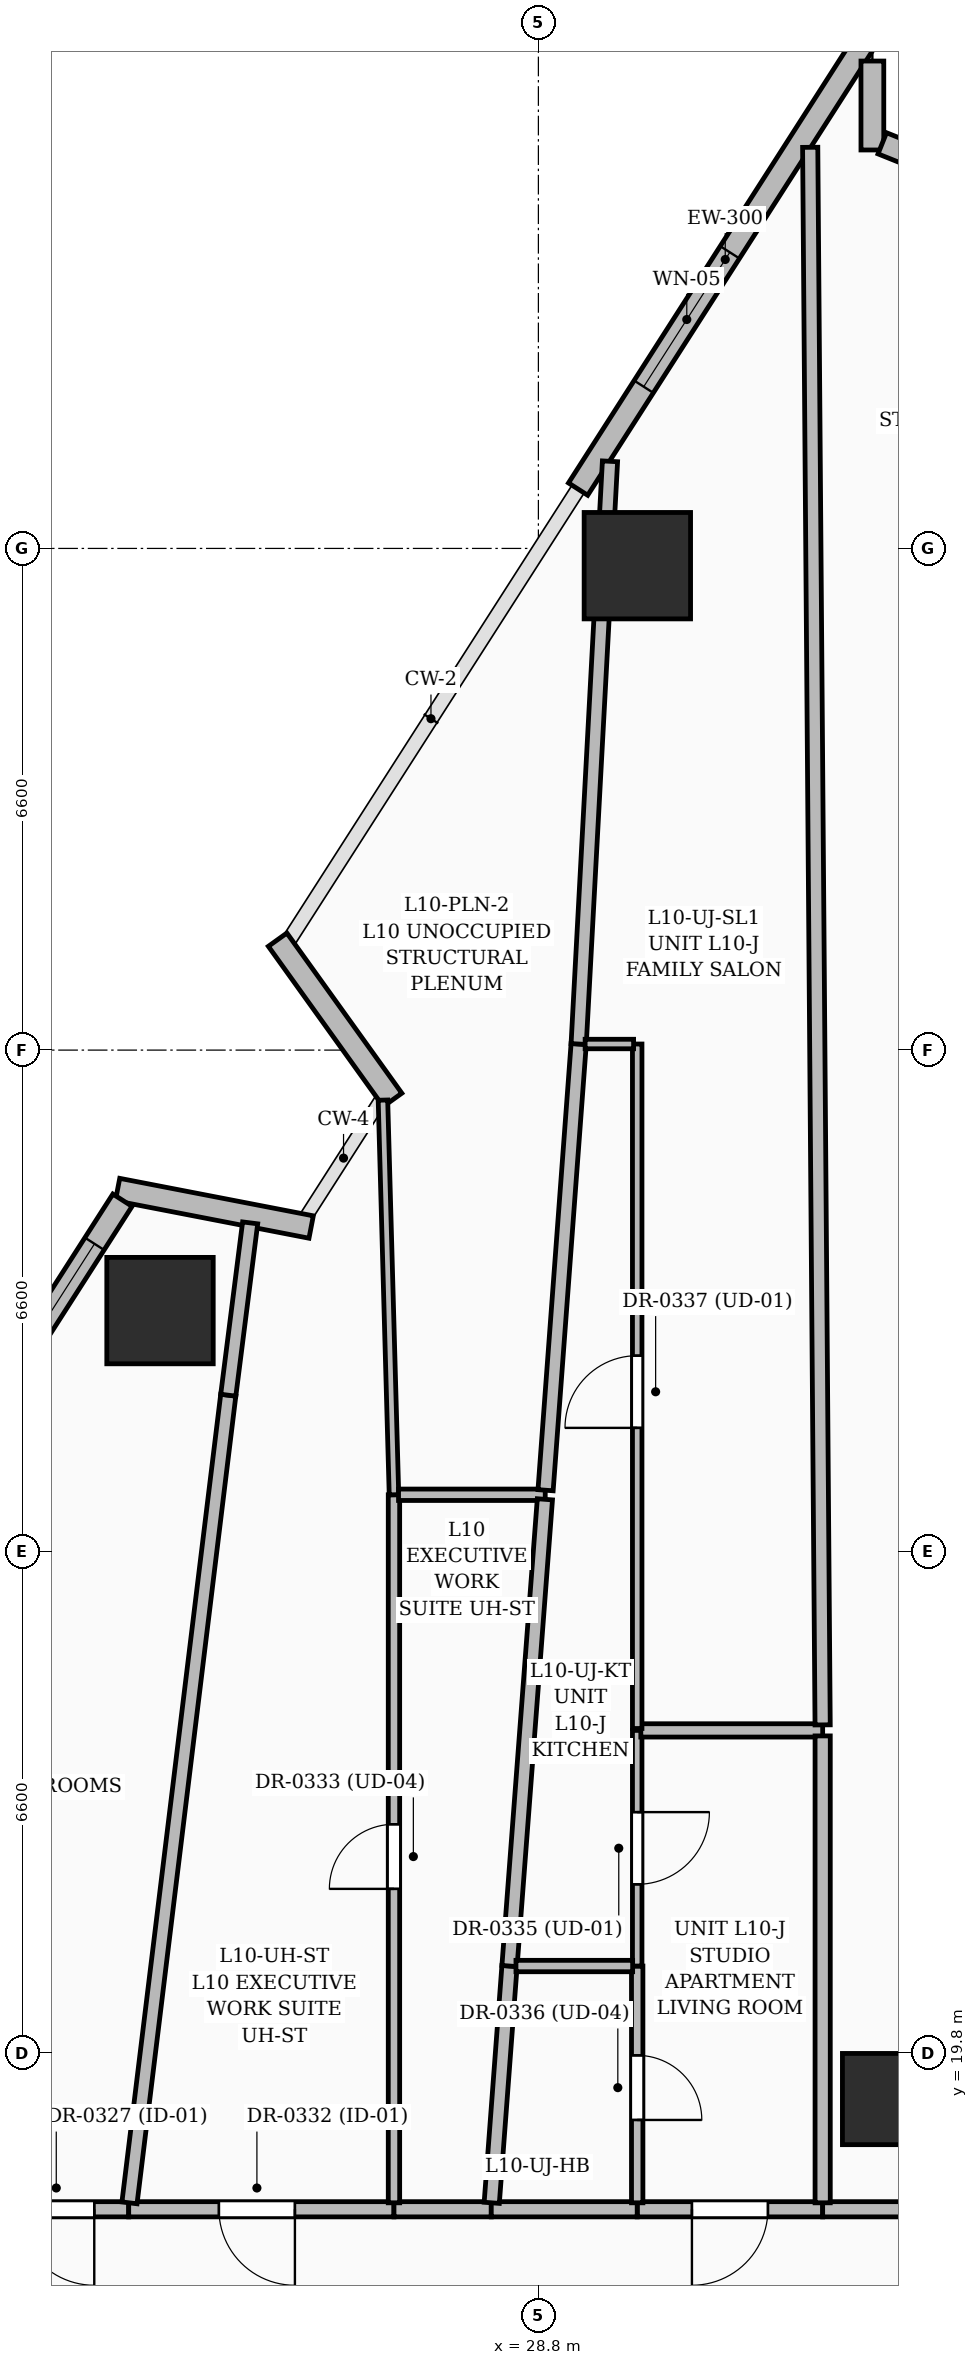
"""IFC4 building model, lengths in metres.
Left out: names, types, materials, properties, quantities, classifications, styles, units other than length and angle.
Written with IfcOpenShell. Run it as: python <this file> out.ifc"""

import sys

from ifc_helpers import new_model, si_unit, direction, frame, frame_2d, origin, origin_2d, place, context, subcontext, project, spatial, rectangle, extrude, element, fill, save


model = new_model("IFC4")
c1 = context("Model", 3, precision=1e-05, world=origin(), true_north=direction((0.0, 1.0)))
c2 = subcontext(c1, "Body", "Model", "MODEL_VIEW")
j1 = project(units=[si_unit("LENGTHUNIT", "METRE"), si_unit("PLANEANGLEUNIT", "RADIAN")], contexts=[c1])
p1 = place(None, origin())
s1 = spatial("IfcSite", under=j1, at=p1, CompositionType="ELEMENT")
p2 = place(p1, origin())
s2 = spatial("IfcBuilding", under=s1, at=p2, CompositionType="ELEMENT")
p3 = place(p2, frame((0.0, 0.0, 46.2)))
s3 = spatial("IfcBuildingStorey", under=s2, at=p3, CompositionType="ELEMENT", Elevation=46.2)
p4 = place(p3, frame((33.4, 19.2, 0.0), z_axis=(0.0, 0.0, 1.0), x_axis=(1.0, 0.0, 0.0)))
e1 = element("IfcColumn", 1, at=p4, inside=s3, PredefinedType="COLUMN", context=c2, shape_type="SweptSolid", body=[
    extrude(rectangle(XDim=1.2, YDim=1.2, at=origin_2d()), origin(), (0.0, 0.0, 1.0), 3.6),
])
for number, where, z_axis, x_axis in (
    (2, (30.102, 39.373, 0.0), (0.0, 0.0, 1.0), (1.0, 0.0, 0.0)),
    (3, (23.822, 29.573, 0.0), (0.0, 0.0, 1.0), (1.0, 0.0, 0.0)),
):
    element("IfcColumn", number, at=place(p3, frame(where, z_axis=z_axis, x_axis=x_axis)), inside=s3, PredefinedType="COLUMN", context=c2, shape_type="SweptSolid", body=[
        extrude(rectangle(XDim=1.4, YDim=1.4, at=origin_2d()), origin(), (0.0, 0.0, 1.0), 3.6),
    ])
p5 = place(p3, frame((23.264, 31.166, 0.0), z_axis=(0.0, 0.0, 1.0), x_axis=(0.981760587394, -0.190121406053, 0.0)))
e4 = element("IfcWall", 4, at=p5, inside=s3, PredefinedType="SOLIDWALL", context=c2, shape_type="SweptSolid", body=[
    extrude(rectangle(XDim=2.594, YDim=0.3, at=frame_2d((1.297, 0.0))), origin(), (0.0, 0.0, 1.0), 2.375),
])
p6 = place(p3, frame((26.882, 32.345, 0.0), z_axis=(0.0, 0.0, 1.0), x_axis=(-0.58299973372, 0.812472344442, 0.0)))
e5 = element("IfcWall", 5, at=p6, inside=s3, PredefinedType="SOLIDWALL", context=c2, shape_type="SweptSolid", body=[
    extrude(rectangle(XDim=2.594, YDim=0.3, at=frame_2d((1.297, 0.0))), origin(), (0.0, 0.0, 1.0), 2.375),
])
p7 = place(p3, frame((29.323, 40.381, 0.0), z_axis=(0.0, 0.0, 1.0), x_axis=(0.539549864139, 0.841953647244, 0.0)))
e6 = element("IfcWall", 6, at=p7, inside=s3, PredefinedType="SOLIDWALL", context=c2, shape_type="SweptSolid", body=[
    extrude(rectangle(XDim=7.176, YDim=0.3, at=frame_2d((3.588, 0.0))), origin(), (0.0, 0.0, 1.0), 3.35),
])
p8 = place(p7, frame((1.6, 0.0, 0.55)))
e7 = element("IfcOpeningElement", 7, at=p8, cuts=e6, PredefinedType="OPENING", context=c2, shape_type="SweptSolid", body=[
    extrude(rectangle(XDim=2.1, YDim=2.4, at=frame_2d((1.05, 1.2))), frame((0.0, 0.16, 0.0), z_axis=(0.0, -1.0, 0.0), x_axis=(1.0, 0.0, 0.0)), (0.0, 0.0, 1.0), 0.32),
])
p9 = place(p3, frame((33.194, 46.012, 0.0), z_axis=(0.0, 0.0, 1.0), x_axis=(0.0, -1.0, 0.0)))
e8 = element("IfcWall", 8, at=p9, inside=s3, PredefinedType="SOLIDWALL", context=c2, shape_type="SweptSolid", body=[
    extrude(rectangle(XDim=1.17, YDim=0.3, at=frame_2d((0.585, 0.0))), origin(), (0.0, 0.0, 1.0), 3.35),
])
p10 = place(p3, frame((33.324, 44.93, 0.0), z_axis=(0.0, 0.0, 1.0), x_axis=(0.928091921944, -0.372351157407, 0.0)))
e9 = element("IfcWall", 9, at=p10, inside=s3, PredefinedType="SOLIDWALL", context=c2, shape_type="SweptSolid", body=[
    extrude(rectangle(XDim=3.023, YDim=0.3, at=frame_2d((1.512, 0.0))), origin(), (0.0, 0.0, 1.0), 3.35),
])
p11 = place(p10, frame((0.57, 0.0, 0.55)))
e10 = element("IfcOpeningElement", 10, at=p11, cuts=e9, PredefinedType="OPENING", context=c2, shape_type="SweptSolid", body=[
    extrude(rectangle(XDim=1.6, YDim=2.2, at=frame_2d((0.8, 1.1))), frame((0.0, 0.16, 0.0), z_axis=(0.0, -1.0, 0.0), x_axis=(1.0, 0.0, 0.0)), (0.0, 0.0, 1.0), 0.32),
])
p12 = place(p3, frame((19.44, 24.958, 0.0), z_axis=(0.0, 0.0, 1.0), x_axis=(0.539536201693, 0.841962402404, 0.0)))
e11 = element("IfcWall", 11, at=p12, inside=s3, PredefinedType="SOLIDWALL", context=c2, shape_type="SweptSolid", body=[
    extrude(rectangle(XDim=7.207, YDim=0.3, at=frame_2d((3.603, 0.0))), origin(), (0.0, 0.0, 1.0), 3.35),
])
p13 = place(p12, frame((1.65, 0.0, 0.6)))
e12 = element("IfcOpeningElement", 12, at=p13, cuts=e11, PredefinedType="OPENING", context=c2, shape_type="SweptSolid", body=[
    extrude(rectangle(XDim=1.5, YDim=2.1, at=frame_2d((0.75, 1.05))), frame((0.0, 0.16, 0.0), z_axis=(0.0, -1.0, 0.0), x_axis=(1.0, 0.0, 0.0)), (0.0, 0.0, 1.0), 0.32),
])
p14 = place(p12, frame((5.025, 0.0, 0.6)))
e13 = element("IfcOpeningElement", 13, at=p14, cuts=e11, PredefinedType="OPENING", context=c2, shape_type="SweptSolid", body=[
    extrude(rectangle(XDim=1.5, YDim=2.1, at=frame_2d((0.75, 1.05))), frame((0.0, 0.16, 0.0), z_axis=(0.0, -1.0, 0.0), x_axis=(1.0, 0.0, 0.0)), (0.0, 0.0, 1.0), 0.32),
])
p15 = place(p3, frame((23.41, 17.75, 0.0), z_axis=(0.0, 0.0, 1.0), x_axis=(-1.0, 0.0, 0.0)))
e14 = element("IfcWall", 14, at=p15, inside=s3, PredefinedType="PARTITIONING", context=c2, shape_type="SweptSolid", body=[
    extrude(rectangle(XDim=1.925, YDim=0.2, at=frame_2d((0.962, 0.0))), origin(), (0.0, 0.0, 1.0), 2.279),
])
p16 = place(p15, frame((0.453, 0.0, 0.0)))
e15 = element("IfcOpeningElement", 15, at=p16, cuts=e14, PredefinedType="OPENING", context=c2, shape_type="SweptSolid", body=[
    extrude(rectangle(XDim=1.0, YDim=2.2, at=frame_2d((0.5, 1.1))), frame((0.0, 0.11, 0.0), z_axis=(0.0, -1.0, 0.0), x_axis=(1.0, 0.0, 0.0)), (0.0, 0.0, 1.0), 0.22),
])
p17 = place(p3, frame((26.9, 17.75, 0.0), z_axis=(0.0, 0.0, 1.0), x_axis=(-1.0, 0.0, 0.0)))
e16 = element("IfcWall", 16, at=p17, inside=s3, PredefinedType="PARTITIONING", context=c2, shape_type="SweptSolid", body=[
    extrude(rectangle(XDim=3.49, YDim=0.2, at=frame_2d((1.745, 0.0))), origin(), (0.0, 0.0, 1.0), 2.279),
])
p18 = place(p17, frame((1.303, 0.0, 0.0)))
e17 = element("IfcOpeningElement", 17, at=p18, cuts=e16, PredefinedType="OPENING", context=c2, shape_type="SweptSolid", body=[
    extrude(rectangle(XDim=1.0, YDim=2.2, at=frame_2d((0.5, 1.1))), frame((0.0, 0.11, 0.0), z_axis=(0.0, -1.0, 0.0), x_axis=(1.0, 0.0, 0.0)), (0.0, 0.0, 1.0), 0.22),
])
p19 = place(p3, frame((28.18, 17.75, 0.0), z_axis=(0.0, 0.0, 1.0), x_axis=(-1.0, 0.0, 0.0)))
e18 = element("IfcWall", 18, at=p19, inside=s3, PredefinedType="PARTITIONING", context=c2, shape_type="SweptSolid", body=[
    extrude(rectangle(XDim=1.28, YDim=0.2, at=frame_2d((0.64, 0.0))), origin(), (0.0, 0.0, 1.0), 3.35),
])
p20 = place(p3, frame((32.54, 17.75, 0.0), z_axis=(0.0, 0.0, 1.0), x_axis=(-1.0, 0.0, 0.0)))
e19 = element("IfcWall", 19, at=p20, inside=s3, PredefinedType="PARTITIONING", context=c2, shape_type="SweptSolid", body=[
    extrude(rectangle(XDim=2.44, YDim=0.2, at=frame_2d((1.22, 0.0))), origin(), (0.0, 0.0, 1.0), 3.35),
])
p21 = place(p20, frame((0.72, 0.0, 0.0)))
e20 = element("IfcOpeningElement", 20, at=p21, cuts=e19, PredefinedType="OPENING", context=c2, shape_type="SweptSolid", body=[
    extrude(rectangle(XDim=1.0, YDim=2.2, at=frame_2d((0.5, 1.1))), frame((0.0, 0.11, 0.0), z_axis=(0.0, -1.0, 0.0), x_axis=(1.0, 0.0, 0.0)), (0.0, 0.0, 1.0), 0.22),
])
p22 = place(p3, frame((30.1, 17.75, 0.0), z_axis=(0.0, 0.0, 1.0), x_axis=(-1.0, 0.0, 0.0)))
e21 = element("IfcWall", 21, at=p22, inside=s3, PredefinedType="PARTITIONING", context=c2, shape_type="SweptSolid", body=[
    extrude(rectangle(XDim=1.92, YDim=0.2, at=frame_2d((0.96, 0.0))), origin(), (0.0, 0.0, 1.0), 3.35),
])
p23 = place(p3, frame((34.95, 17.75, 0.0), z_axis=(0.0, 0.0, 1.0), x_axis=(-1.0, 0.0, 0.0)))
e22 = element("IfcWall", 22, at=p23, inside=s3, PredefinedType="PARTITIONING", context=c2, shape_type="SweptSolid", body=[
    extrude(rectangle(XDim=2.41, YDim=0.2, at=frame_2d((1.205, 0.0))), origin(), (0.0, 0.0, 1.0), 2.309),
])
p24 = place(p3, frame((23.42, 17.834, 0.0), z_axis=(0.0, 0.0, 1.0), x_axis=(0.121401324793, 0.992603505101, 0.0)))
e23 = element("IfcWall", 23, at=p24, inside=s3, PredefinedType="PARTITIONING", context=c2, shape_type="SweptSolid", body=[
    extrude(rectangle(XDim=10.705, YDim=0.2, at=frame_2d((5.352, 0.0))), origin(), (0.0, 0.0, 1.0), 2.279),
])
p25 = place(p3, frame((24.72, 28.46, 0.0), z_axis=(0.0, 0.0, 1.0), x_axis=(0.126059314356, 0.992022706022, 0.0)))
e24 = element("IfcWall", 24, at=p25, inside=s3, PredefinedType="PARTITIONING", context=c2, shape_type="SweptSolid", body=[
    extrude(rectangle(XDim=2.285, YDim=0.2, at=frame_2d((1.143, 0.0))), origin(), (0.0, 0.0, 1.0), 2.279),
])
p26 = place(p3, frame((26.9, 17.835, 0.0), z_axis=(0.0, 0.0, 1.0), x_axis=(0.0, 1.0, 0.0)))
e25 = element("IfcWall", 25, at=p26, inside=s3, PredefinedType="PARTITIONING", context=c2, shape_type="SweptSolid", body=[
    extrude(rectangle(XDim=9.315, YDim=0.15, at=frame_2d((4.657, 0.0))), origin(), (0.0, 0.0, 1.0), 2.279),
])
p27 = place(p26, frame((4.13, 0.0, 0.0)))
e26 = element("IfcOpeningElement", 26, at=p27, cuts=e25, PredefinedType="OPENING", context=c2, shape_type="SweptSolid", body=[
    extrude(rectangle(XDim=0.85, YDim=2.1, at=frame_2d((0.425, 1.05))), frame((0.0, 0.085, 0.0), z_axis=(0.0, -1.0, 0.0), x_axis=(1.0, 0.0, 0.0)), (0.0, 0.0, 1.0), 0.17),
])
p28 = place(p3, frame((26.9, 27.15, 0.0), z_axis=(0.0, 0.0, 1.0), x_axis=(-0.027919708485, 0.999610168955, 0.0)))
e27 = element("IfcWall", 27, at=p28, inside=s3, PredefinedType="PARTITIONING", context=c2, shape_type="SweptSolid", body=[
    extrude(rectangle(XDim=5.194, YDim=0.125, at=frame_2d((2.597, 0.0))), origin(), (0.0, 0.0, 1.0), 3.35),
])
p29 = place(p3, frame((28.89, 27.15, 0.0), z_axis=(0.0, 0.0, 1.0), x_axis=(-1.0, 0.0, 0.0)))
e28 = element("IfcWall", 28, at=p29, inside=s3, PredefinedType="PARTITIONING", context=c2, shape_type="SweptSolid", body=[
    extrude(rectangle(XDim=1.93, YDim=0.15, at=frame_2d((0.965, 0.0))), origin(), (0.0, 0.0, 1.0), 2.86),
])
p30 = place(p3, frame((28.186, 17.835, 0.0), z_axis=(0.0, 0.0, 1.0), x_axis=(0.074789948242, 0.997199309888, 0.0)))
e29 = element("IfcWall", 29, at=p30, inside=s3, PredefinedType="PARTITIONING", context=c2, shape_type="SweptSolid", body=[
    extrude(rectangle(XDim=3.124, YDim=0.2, at=frame_2d((1.562, 0.0))), origin(), (0.0, 0.0, 1.0), 2.86),
])
p31 = place(p3, frame((28.42, 20.95, 0.0), z_axis=(0.0, 0.0, 1.0), x_axis=(0.075608009432, 0.997137617839, 0.0)))
e30 = element("IfcWall", 30, at=p31, inside=s3, PredefinedType="PARTITIONING", context=c2, shape_type="SweptSolid", body=[
    extrude(rectangle(XDim=6.158, YDim=0.2, at=frame_2d((3.079, 0.0))), origin(), (0.0, 0.0, 1.0), 2.279),
])
p32 = place(p3, frame((28.894, 27.21, 0.0), z_axis=(0.0, 0.0, 1.0), x_axis=(0.074032094362, 0.997255859348, 0.0)))
e31 = element("IfcWall", 31, at=p32, inside=s3, PredefinedType="PARTITIONING", context=c2, shape_type="SweptSolid", body=[
    extrude(rectangle(XDim=5.886, YDim=0.2, at=frame_2d((2.943, 0.0))), origin(), (0.0, 0.0, 1.0), 2.86),
])
p33 = place(p3, frame((29.33, 33.08, 0.0), z_axis=(0.0, 0.0, 1.0), x_axis=(0.05364874202, 0.998559869252, 0.0)))
e32 = element("IfcWall", 32, at=p33, inside=s3, PredefinedType="PARTITIONING", context=c2, shape_type="SweptSolid", body=[
    extrude(rectangle(XDim=7.677, YDim=0.2, at=frame_2d((3.838, 0.0))), origin(), (0.0, 0.0, 1.0), 2.37),
])
p34 = place(p3, frame((30.1, 20.95, 0.0), z_axis=(0.0, 0.0, 1.0), x_axis=(0.0, -1.0, 0.0)))
e33 = element("IfcWall", 33, at=p34, inside=s3, PredefinedType="PARTITIONING", context=c2, shape_type="SweptSolid", body=[
    extrude(rectangle(XDim=3.115, YDim=0.15, at=frame_2d((1.558, 0.0))), origin(), (0.0, 0.0, 1.0), 3.35),
])
p35 = place(p34, frame((1.175, 0.0, 0.0)))
e34 = element("IfcOpeningElement", 34, at=p35, cuts=e33, PredefinedType="OPENING", context=c2, shape_type="SweptSolid", body=[
    extrude(rectangle(XDim=0.85, YDim=2.1, at=frame_2d((0.425, 1.05))), frame((0.0, 0.085, 0.0), z_axis=(0.0, -1.0, 0.0), x_axis=(1.0, 0.0, 0.0)), (0.0, 0.0, 1.0), 0.17),
])
p36 = place(p3, frame((30.1, 24.05, 0.0), z_axis=(0.0, 0.0, 1.0), x_axis=(0.0, -1.0, 0.0)))
e35 = element("IfcWall", 35, at=p36, inside=s3, PredefinedType="PARTITIONING", context=c2, shape_type="SweptSolid", body=[
    extrude(rectangle(XDim=3.1, YDim=0.125, at=frame_2d((1.55, 0.0))), origin(), (0.0, 0.0, 1.0), 2.279),
])
p37 = place(p36, frame((1.075, 0.0, 0.0)))
e36 = element("IfcOpeningElement", 36, at=p37, cuts=e35, PredefinedType="OPENING", context=c2, shape_type="SweptSolid", body=[
    extrude(rectangle(XDim=0.95, YDim=2.2, at=frame_2d((0.475, 1.1))), frame((0.0, 0.072, 0.0), z_axis=(0.0, -1.0, 0.0), x_axis=(1.0, 0.0, 0.0)), (0.0, 0.0, 1.0), 0.145),
])
p38 = place(p3, frame((32.54, 24.05, 0.0), z_axis=(0.0, 0.0, 1.0), x_axis=(-1.0, 0.0, 0.0)))
e37 = element("IfcWall", 37, at=p38, inside=s3, PredefinedType="PARTITIONING", context=c2, shape_type="SweptSolid", body=[
    extrude(rectangle(XDim=2.393, YDim=0.175, at=frame_2d((1.196, 0.0))), origin(), (0.0, 0.0, 1.0), 2.86),
])
p39 = place(p3, frame((32.54, 17.835, 0.0), z_axis=(0.0, 0.0, 1.0), x_axis=(0.0, 1.0, 0.0)))
e38 = element("IfcWall", 38, at=p39, inside=s3, PredefinedType="PARTITIONING", context=c2, shape_type="SweptSolid", body=[
    extrude(rectangle(XDim=6.143, YDim=0.2, at=frame_2d((3.071, 0.0))), origin(), (0.0, 0.0, 1.0), 2.279),
])
p40 = place(p3, frame((30.04, 20.95, 0.0), z_axis=(0.0, 0.0, 1.0), x_axis=(-1.0, 0.0, 0.0)))
e39 = element("IfcWall", 39, at=p40, inside=s3, PredefinedType="PARTITIONING", context=c2, shape_type="SweptSolid", body=[
    extrude(rectangle(XDim=1.535, YDim=0.15, at=frame_2d((0.768, 0.0))), origin(), (0.0, 0.0, 1.0), 2.86),
])
p41 = place(p3, frame((30.1, 24.075, 0.0), z_axis=(0.0, 0.0, 1.0), x_axis=(0.0, 1.0, 0.0)))
e40 = element("IfcWall", 40, at=p41, inside=s3, PredefinedType="PARTITIONING", context=c2, shape_type="SweptSolid", body=[
    extrude(rectangle(XDim=9.005, YDim=0.125, at=frame_2d((4.502, 0.0))), origin(), (0.0, 0.0, 1.0), 2.86),
])
p42 = place(p41, frame((3.955, 0.0, 0.0)))
e41 = element("IfcOpeningElement", 41, at=p42, cuts=e40, PredefinedType="OPENING", context=c2, shape_type="SweptSolid", body=[
    extrude(rectangle(XDim=0.95, YDim=2.2, at=frame_2d((0.475, 1.1))), frame((0.0, 0.072, 0.0), z_axis=(0.0, -1.0, 0.0), x_axis=(1.0, 0.0, 0.0)), (0.0, 0.0, 1.0), 0.145),
])
p43 = place(p3, frame((30.052, 33.08, 0.0), z_axis=(0.0, 0.0, 1.0), x_axis=(-1.0, 0.0, 0.0)))
e42 = element("IfcWall", 42, at=p43, inside=s3, PredefinedType="PARTITIONING", context=c2, shape_type="SweptSolid", body=[
    extrude(rectangle(XDim=0.637, YDim=0.125, at=frame_2d((0.319, 0.0))), origin(), (0.0, 0.0, 1.0), 3.35),
])
p44 = place(p3, frame((32.54, 24.123, 0.0), z_axis=(0.0, 0.0, 1.0), x_axis=(-0.007881180941, 0.999968943011, 0.0)))
e43 = element("IfcWall", 43, at=p44, inside=s3, PredefinedType="PARTITIONING", context=c2, shape_type="SweptSolid", body=[
    extrude(rectangle(XDim=20.755, YDim=0.2, at=frame_2d((10.377, 0.0))), origin(), (0.0, 0.0, 1.0), 2.279),
])
p45 = place(p8, origin())
e44 = element("IfcWindow", 44, at=p45, inside=s3, PartitioningType="SINGLE_PANEL", PredefinedType="WINDOW", context=c2, shape_type="SweptSolid", body=[
    extrude(rectangle(XDim=2.1, YDim=2.4, at=frame_2d((1.05, 1.2))), frame((0.0, 0.03, 0.0), z_axis=(0.0, -1.0, 0.0), x_axis=(1.0, 0.0, 0.0)), (0.0, 0.0, 1.0), 0.06),
])
fill(e7, e44)
p46 = place(p14, origin())
e45 = element("IfcWindow", 45, at=p46, inside=s3, PartitioningType="SINGLE_PANEL", PredefinedType="WINDOW", context=c2, shape_type="SweptSolid", body=[
    extrude(rectangle(XDim=1.5, YDim=2.1, at=frame_2d((0.75, 1.05))), frame((0.0, 0.03, 0.0), z_axis=(0.0, -1.0, 0.0), x_axis=(1.0, 0.0, 0.0)), (0.0, 0.0, 1.0), 0.06),
])
fill(e13, e45)
p47 = place(p16, origin())
e46 = element("IfcDoor", 46, at=p47, inside=s3, OperationType="SINGLE_SWING_LEFT", PredefinedType="DOOR", context=c2, shape_type="SweptSolid", body=[
    extrude(rectangle(XDim=1.0, YDim=2.2, at=frame_2d((0.5, 1.1))), frame((0.0, 0.025, 0.0), z_axis=(0.0, -1.0, 0.0), x_axis=(1.0, 0.0, 0.0)), (0.0, 0.0, 1.0), 0.05),
])
fill(e15, e46)
p48 = place(p18, origin())
e47 = element("IfcDoor", 47, at=p48, inside=s3, OperationType="SINGLE_SWING_LEFT", PredefinedType="DOOR", context=c2, shape_type="SweptSolid", body=[
    extrude(rectangle(XDim=1.0, YDim=2.2, at=frame_2d((0.5, 1.1))), frame((0.0, 0.025, 0.0), z_axis=(0.0, -1.0, 0.0), x_axis=(1.0, 0.0, 0.0)), (0.0, 0.0, 1.0), 0.05),
])
fill(e17, e47)
p49 = place(p27, origin())
e48 = element("IfcDoor", 48, at=p49, inside=s3, OperationType="SINGLE_SWING_LEFT", PredefinedType="DOOR", context=c2, shape_type="SweptSolid", body=[
    extrude(rectangle(XDim=0.85, YDim=2.1, at=frame_2d((0.425, 1.05))), frame((0.0, 0.025, 0.0), z_axis=(0.0, -1.0, 0.0), x_axis=(1.0, 0.0, 0.0)), (0.0, 0.0, 1.0), 0.05),
])
fill(e26, e48)
p50 = place(p21, origin())
e49 = element("IfcDoor", 49, at=p50, inside=s3, OperationType="SINGLE_SWING_RIGHT", PredefinedType="DOOR", context=c2, shape_type="SweptSolid", body=[
    extrude(rectangle(XDim=1.0, YDim=2.2, at=frame_2d((0.5, 1.1))), frame((0.0, 0.025, 0.0), z_axis=(0.0, -1.0, 0.0), x_axis=(1.0, 0.0, 0.0)), (0.0, 0.0, 1.0), 0.05),
])
fill(e20, e49)
p51 = place(p37, origin())
e50 = element("IfcDoor", 50, at=p51, inside=s3, OperationType="SINGLE_SWING_LEFT", PredefinedType="DOOR", context=c2, shape_type="SweptSolid", body=[
    extrude(rectangle(XDim=0.95, YDim=2.2, at=frame_2d((0.475, 1.1))), frame((0.0, 0.025, 0.0), z_axis=(0.0, -1.0, 0.0), x_axis=(1.0, 0.0, 0.0)), (0.0, 0.0, 1.0), 0.05),
])
fill(e36, e50)
p52 = place(p35, origin())
e51 = element("IfcDoor", 51, at=p52, inside=s3, OperationType="SINGLE_SWING_RIGHT", PredefinedType="DOOR", context=c2, shape_type="SweptSolid", body=[
    extrude(rectangle(XDim=0.85, YDim=2.1, at=frame_2d((0.425, 1.05))), frame((0.0, 0.025, 0.0), z_axis=(0.0, -1.0, 0.0), x_axis=(1.0, 0.0, 0.0)), (0.0, 0.0, 1.0), 0.05),
])
fill(e34, e51)
p53 = place(p42, origin())
e52 = element("IfcDoor", 52, at=p53, inside=s3, OperationType="SINGLE_SWING_LEFT", PredefinedType="DOOR", context=c2, shape_type="SweptSolid", body=[
    extrude(rectangle(XDim=0.95, YDim=2.2, at=frame_2d((0.475, 1.1))), frame((0.0, 0.025, 0.0), z_axis=(0.0, -1.0, 0.0), x_axis=(1.0, 0.0, 0.0)), (0.0, 0.0, 1.0), 0.05),
])
fill(e41, e52)
save(model, sys.argv[1])
